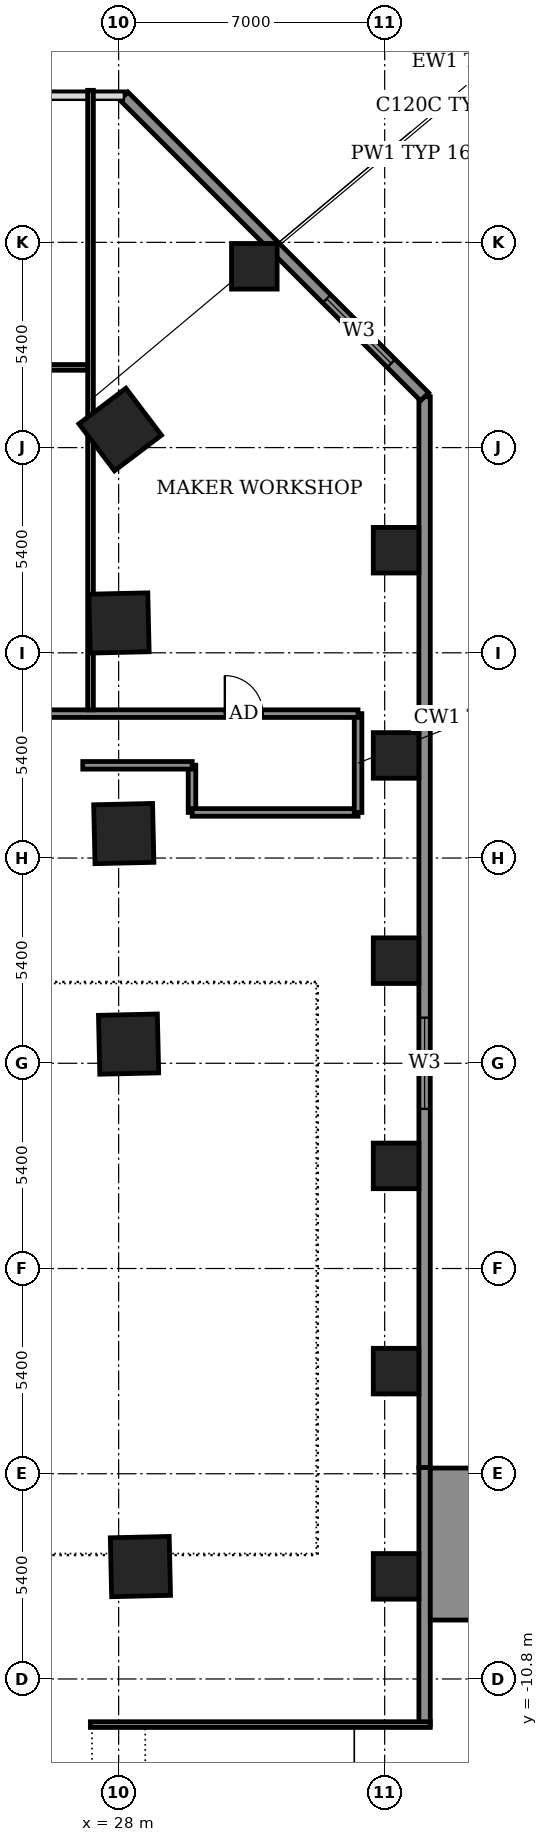
"""IFC4 building model, lengths in metres.
Left out: names, types, materials, properties, quantities, classifications, styles, units other than length and angle.
Written with IfcOpenShell. Run it as: python <this file> out.ifc"""

import sys

from ifc_helpers import new_model, si_unit, direction, frame, frame_2d, origin, origin_2d, place, context, subcontext, project, spatial, rectangle, extrude, element, fill, save


model = new_model("IFC4")
c1 = context("Model", 3, precision=1e-05, world=origin(), true_north=direction((0.0, 1.0)))
c2 = subcontext(c1, "Body", "Model", "MODEL_VIEW")
j1 = project(units=[si_unit("LENGTHUNIT", "METRE"), si_unit("PLANEANGLEUNIT", "RADIAN")], contexts=[c1])
p1 = place(None, origin())
s1 = spatial("IfcSite", under=j1, at=p1, CompositionType="ELEMENT")
p2 = place(p1, origin())
s2 = spatial("IfcBuilding", under=s1, at=p2, CompositionType="ELEMENT")
p3 = place(p2, frame((0.0, 0.0, 20.5)))
s3 = spatial("IfcBuildingStorey", under=s2, at=p3, CompositionType="ELEMENT", Elevation=20.5)
for number, where, z_axis, x_axis in (
    (1, (28.573, -7.843, -0.55), (0.0, 0.0, 1.0), (-0.023, 1.0, 0.0)),
    (2, (28.261, 5.904, -0.55), (0.0, 0.0, 1.0), (-0.023, 1.0, 0.0)),
    (3, (28.135, 11.444, -0.55), (0.0, 0.0, 1.0), (-0.023, 1.0, 0.0)),
    (4, (28.01, 16.985, -0.55), (0.0, 0.0, 1.0), (-0.023, 1.0, 0.0)),
    (5, (28.041, 22.075, -0.55), (0.0, 0.0, 1.0), (-0.604, 0.797, 0.0)),
):
    element("IfcColumn", number, at=place(p3, frame(where, z_axis=z_axis, x_axis=x_axis)), inside=s3, PredefinedType="COLUMN", context=c2, shape_type="SweptSolid", body=[
        extrude(rectangle(XDim=1.55, YDim=1.55, at=origin_2d()), origin(), (0.0, 0.0, 1.0), 4.5),
    ])
for number, where, z_axis, x_axis in (
    (6, (35.3, -8.1, -0.55), (0.0, 0.0, 1.0), (1.0, 0.0, 0.0)),
    (7, (35.3, -2.7, -0.55), (0.0, 0.0, 1.0), (1.0, 0.0, 0.0)),
    (8, (35.3, 2.7, -0.55), (0.0, 0.0, 1.0), (1.0, 0.0, 0.0)),
    (9, (35.3, 8.1, -0.55), (0.0, 0.0, 1.0), (1.0, 0.0, 0.0)),
    (10, (35.3, 13.5, -0.55), (0.0, 0.0, 1.0), (1.0, 0.0, 0.0)),
    (11, (35.3, 18.9, -0.55), (0.0, 0.0, 1.0), (1.0, 0.0, 0.0)),
    (12, (31.57, 26.37, -0.55), (0.0, 0.0, 1.0), (1.0, 0.0, 0.0)),
):
    element("IfcColumn", number, at=place(p3, frame(where, z_axis=z_axis, x_axis=x_axis)), inside=s3, PredefinedType="COLUMN", context=c2, shape_type="SweptSolid", body=[
        extrude(rectangle(XDim=1.2, YDim=1.2, at=origin_2d()), origin(), (0.0, 0.0, 1.0), 4.5),
    ])
p4 = place(p3, frame((36.05, -12.0, 0.0), z_axis=(0.0, 0.0, 1.0), x_axis=(0.0, 1.0, 0.0)))
e13 = element("IfcWall", 13, at=p4, inside=s3, PredefinedType="SOLIDWALL", context=c2, shape_type="SweptSolid", body=[
    extrude(rectangle(XDim=6.764, YDim=0.3, at=frame_2d((3.382, 0.0))), origin(), (0.0, 0.0, 1.0), 3.95),
])
p5 = place(p3, frame((36.05, -5.236, 0.0), z_axis=(0.0, 0.0, 1.0), x_axis=(0.0, 1.0, 0.0)))
e14 = element("IfcWall", 14, at=p5, inside=s3, PredefinedType="SOLIDWALL", context=c2, shape_type="SweptSolid", body=[
    extrude(rectangle(XDim=28.174, YDim=0.3, at=frame_2d((14.087, 0.0))), origin(), (0.0, 0.0, 1.0), 3.95),
])
p6 = place(p5, frame((9.436, 0.0, 0.9)))
e15 = element("IfcOpeningElement", 15, at=p6, cuts=e14, PredefinedType="OPENING", context=c2, shape_type="SweptSolid", body=[
    extrude(rectangle(XDim=2.4, YDim=1.8, at=frame_2d((1.2, 0.9))), frame((0.0, 0.16, 0.0), z_axis=(0.0, -1.0, 0.0), x_axis=(1.0, 0.0, 0.0)), (0.0, 0.0, 1.0), 0.32),
])
p7 = place(p3, frame((36.05, 22.938, 0.0), z_axis=(0.0, 0.0, 1.0), x_axis=(-0.707106781187, 0.707106781187, 0.0)))
e16 = element("IfcWall", 16, at=p7, inside=s3, PredefinedType="SOLIDWALL", context=c2, shape_type="SweptSolid", body=[
    extrude(rectangle(XDim=11.189, YDim=0.3, at=frame_2d((5.595, 0.0))), origin(), (0.0, 0.0, 1.0), 3.95),
])
p8 = place(p7, frame((1.242, 0.0, 0.9)))
e17 = element("IfcOpeningElement", 17, at=p8, cuts=e16, PredefinedType="OPENING", context=c2, shape_type="SweptSolid", body=[
    extrude(rectangle(XDim=2.4, YDim=1.8, at=frame_2d((1.2, 0.9))), frame((0.0, 0.16, 0.0), z_axis=(0.0, -1.0, 0.0), x_axis=(1.0, 0.0, 0.0)), (0.0, 0.0, 1.0), 0.32),
])
p9 = place(p3, frame((37.45, -9.25, 0.0), z_axis=(0.0, 0.0, 1.0), x_axis=(0.0, 1.0, 0.0)))
e18 = element("IfcWall", 18, at=p9, inside=s3, PredefinedType="STANDARD", context=c2, shape_type="SweptSolid", body=[
    extrude(rectangle(XDim=4.0, YDim=2.5, at=frame_2d((2.0, 0.0))), origin(), (0.0, 0.0, 1.0), 4.5),
])
p10 = place(p3, frame((27.256, -12.0, 0.0), z_axis=(0.0, 0.0, 1.0), x_axis=(1.0, 0.0, 0.0)))
e19 = element("IfcWall", 19, at=p10, inside=s3, PredefinedType="PARTITIONING", context=c2, shape_type="SweptSolid", body=[
    extrude(rectangle(XDim=8.944, YDim=0.15, at=frame_2d((4.472, 0.0))), origin(), (0.0, 0.0, 1.0), 3.95),
])
p11 = place(p3, frame((29.93, 12.0, 0.0), z_axis=(0.0, 0.0, 1.0), x_axis=(0.0, 1.0, 0.0)))
e20 = element("IfcWall", 20, at=p11, inside=s3, PredefinedType="PARTITIONING", context=c2, shape_type="SweptSolid", body=[
    extrude(rectangle(XDim=1.244, YDim=0.2, at=frame_2d((0.622, 0.0))), origin(), (0.0, 0.0, 1.0), 3.95),
])
p12 = place(p3, frame((29.935, 12.0, 0.0), z_axis=(0.0, 0.0, 1.0), x_axis=(1.0, 0.0, 0.0)))
e21 = element("IfcWall", 21, at=p12, inside=s3, PredefinedType="PARTITIONING", context=c2, shape_type="SweptSolid", body=[
    extrude(rectangle(XDim=4.365, YDim=0.2, at=frame_2d((2.183, 0.0))), origin(), (0.0, 0.0, 1.0), 3.95),
])
p13 = place(p3, frame((34.3, 12.0, 0.0), z_axis=(0.0, 0.0, 1.0), x_axis=(0.0, 1.0, 0.0)))
e22 = element("IfcWall", 22, at=p13, inside=s3, PredefinedType="PARTITIONING", context=c2, shape_type="SweptSolid", body=[
    extrude(rectangle(XDim=2.6, YDim=0.2, at=frame_2d((1.3, 0.0))), origin(), (0.0, 0.0, 1.0), 3.95),
])
p14 = place(p3, frame((27.056, 13.24, 0.0), z_axis=(0.0, 0.0, 1.0), x_axis=(1.0, 0.0, 0.0)))
e23 = element("IfcWall", 23, at=p14, inside=s3, PredefinedType="PARTITIONING", context=c2, shape_type="SweptSolid", body=[
    extrude(rectangle(XDim=2.879, YDim=0.2, at=frame_2d((1.439, 0.0))), origin(), (0.0, 0.0, 1.0), 3.95),
])
p15 = place(p3, frame((17.6, 14.6, 0.0), z_axis=(0.0, 0.0, 1.0), x_axis=(1.0, 0.0, 0.0)))
e24 = element("IfcWall", 24, at=p15, inside=s3, PredefinedType="PARTITIONING", context=c2, shape_type="SweptSolid", body=[
    extrude(rectangle(XDim=16.7, YDim=0.2, at=frame_2d((8.35, 0.0))), origin(), (0.0, 0.0, 1.0), 3.95),
])
p16 = place(p15, frame((13.194, 0.0, 0.0)))
e25 = element("IfcOpeningElement", 25, at=p16, cuts=e24, PredefinedType="OPENING", context=c2, shape_type="SweptSolid", body=[
    extrude(rectangle(XDim=1.0, YDim=2.1, at=frame_2d((0.5, 1.05))), frame((0.0, 0.11, 0.0), z_axis=(0.0, -1.0, 0.0), x_axis=(1.0, 0.0, 0.0)), (0.0, 0.0, 1.0), 0.22),
])
p17 = place(p3, frame((27.26, 14.7, 0.0), z_axis=(0.0, 0.0, 1.0), x_axis=(0.0, 1.0, 0.0)))
e26 = element("IfcWall", 26, at=p17, inside=s3, PredefinedType="PARTITIONING", context=c2, shape_type="SweptSolid", body=[
    extrude(rectangle(XDim=16.3, YDim=0.15, at=frame_2d((8.15, 0.0))), origin(), (0.0, 0.0, 1.0), 0.94),
])
p18 = place(p3, frame((17.7, 23.71, 0.0), z_axis=(0.0, 0.0, 1.0), x_axis=(1.0, 0.0, 0.0)))
e27 = element("IfcWall", 27, at=p18, inside=s3, PredefinedType="PARTITIONING", context=c2, shape_type="SweptSolid", body=[
    extrude(rectangle(XDim=9.485, YDim=0.15, at=frame_2d((4.743, 0.0))), origin(), (0.0, 0.0, 1.0), 3.95),
])
p19 = place(p6, origin())
e28 = element("IfcWindow", 28, at=p19, inside=s3, PartitioningType="DOUBLE_PANEL_VERTICAL", PredefinedType="WINDOW", context=c2, shape_type="SweptSolid", body=[
    extrude(rectangle(XDim=2.4, YDim=1.8, at=frame_2d((1.2, 0.9))), frame((0.0, 0.03, 0.0), z_axis=(0.0, -1.0, 0.0), x_axis=(1.0, 0.0, 0.0)), (0.0, 0.0, 1.0), 0.06),
])
fill(e15, e28)
p20 = place(p8, origin())
e29 = element("IfcWindow", 29, at=p20, inside=s3, PartitioningType="DOUBLE_PANEL_VERTICAL", PredefinedType="WINDOW", context=c2, shape_type="SweptSolid", body=[
    extrude(rectangle(XDim=2.4, YDim=1.8, at=frame_2d((1.2, 0.9))), frame((0.0, 0.03, 0.0), z_axis=(0.0, -1.0, 0.0), x_axis=(1.0, 0.0, 0.0)), (0.0, 0.0, 1.0), 0.06),
])
fill(e17, e29)
p21 = place(p16, origin())
e30 = element("IfcDoor", 30, at=p21, inside=s3, OperationType="SINGLE_SWING_LEFT", PredefinedType="DOOR", context=c2, shape_type="SweptSolid", body=[
    extrude(rectangle(XDim=1.0, YDim=2.1, at=frame_2d((0.5, 1.05))), frame((0.0, 0.025, 0.0), z_axis=(0.0, -1.0, 0.0), x_axis=(1.0, 0.0, 0.0)), (0.0, 0.0, 1.0), 0.05),
])
fill(e25, e30)
save(model, sys.argv[1])
